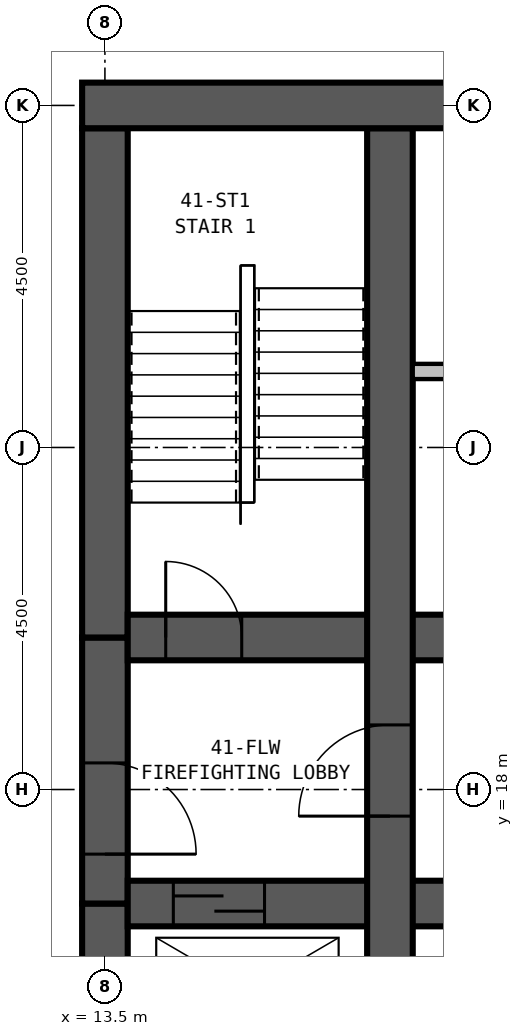
"""IFC4 building model, lengths in metres.
Left out: names, types, materials, properties, quantities, classifications, styles, units other than length and angle.
Written with IfcOpenShell. Run it as: python <this file> out.ifc"""

import sys

from ifc_helpers import new_model, si_unit, direction, frame, frame_2d, origin, place, context, subcontext, project, spatial, rectangle, extrude, element, fill, save


model = new_model("IFC4")
c1 = context("Model", 3, precision=1e-05, world=origin(), true_north=direction((0.0, 1.0)))
c2 = subcontext(c1, "Body", "Model", "MODEL_VIEW")
j1 = project(units=[si_unit("LENGTHUNIT", "METRE"), si_unit("PLANEANGLEUNIT", "RADIAN")], contexts=[c1])
p1 = place(None, origin())
s1 = spatial("IfcSite", under=j1, at=p1, CompositionType="ELEMENT")
p2 = place(p1, origin())
s2 = spatial("IfcBuilding", under=s1, at=p2, CompositionType="ELEMENT")
p3 = place(p2, frame((0.0, 0.0, 162.4)))
s3 = spatial("IfcBuildingStorey", under=s2, at=p3, CompositionType="ELEMENT", Elevation=162.4)
p4 = place(p3, frame((36.3, 27.0, 0.0), z_axis=(0.0, 0.0, 1.0), x_axis=(-1.0, 0.0, 0.0)))
e1 = element("IfcWall", 1, at=p4, inside=s3, PredefinedType="SHEAR", context=c2, shape_type="SweptSolid", body=[
    extrude(rectangle(XDim=23.1, YDim=0.6, at=frame_2d((11.55, 0.0))), origin(), (0.0, 0.0, 1.0), 3.5),
])
p5 = place(p4, frame((17.05, 0.0, 0.0)))
e2 = element("IfcOpeningElement", 2, at=p5, cuts=e1, PredefinedType="OPENING", context=c2, shape_type="SweptSolid", body=[
    extrude(rectangle(XDim=1.0, YDim=2.1, at=frame_2d((0.5, 1.05))), frame((0.0, 0.31, 0.0), z_axis=(0.0, -1.0, 0.0), x_axis=(1.0, 0.0, 0.0)), (0.0, 0.0, 1.0), 0.62),
])
p6 = place(p4, frame((12.05, 0.0, 0.0)))
e3 = element("IfcOpeningElement", 3, at=p6, cuts=e1, PredefinedType="OPENING", context=c2, shape_type="SweptSolid", body=[
    extrude(rectangle(XDim=1.0, YDim=2.1, at=frame_2d((0.5, 1.05))), frame((0.0, 0.31, 0.0), z_axis=(0.0, -1.0, 0.0), x_axis=(1.0, 0.0, 0.0)), (0.0, 0.0, 1.0), 0.62),
])
p7 = place(p4, frame((7.05, 0.0, 0.0)))
e4 = element("IfcOpeningElement", 4, at=p7, cuts=e1, PredefinedType="OPENING", context=c2, shape_type="SweptSolid", body=[
    extrude(rectangle(XDim=1.0, YDim=2.1, at=frame_2d((0.5, 1.05))), frame((0.0, 0.31, 0.0), z_axis=(0.0, -1.0, 0.0), x_axis=(1.0, 0.0, 0.0)), (0.0, 0.0, 1.0), 0.62),
])
p8 = place(p3, frame((17.25, 13.8, 0.0), z_axis=(0.0, 0.0, 1.0), x_axis=(0.0, 1.0, 0.0)))
e5 = element("IfcWall", 5, at=p8, inside=s3, PredefinedType="SHEAR", context=c2, shape_type="SweptSolid", body=[
    extrude(rectangle(XDim=12.9, YDim=0.6, at=frame_2d((6.45, 0.0))), origin(), (0.0, 0.0, 1.0), 3.5),
])
p9 = place(p8, frame((3.85, 0.0, 0.0)))
e6 = element("IfcOpeningElement", 6, at=p9, cuts=e5, PredefinedType="OPENING", context=c2, shape_type="SweptSolid", body=[
    extrude(rectangle(XDim=1.2, YDim=2.1, at=frame_2d((0.6, 1.05))), frame((0.0, 0.31, 0.0), z_axis=(0.0, -1.0, 0.0), x_axis=(1.0, 0.0, 0.0)), (0.0, 0.0, 1.0), 0.62),
])
p10 = place(p3, frame((13.8, 16.5, 0.0), z_axis=(0.0, 0.0, 1.0), x_axis=(1.0, 0.0, 0.0)))
e7 = element("IfcWall", 7, at=p10, inside=s3, PredefinedType="SHEAR", context=c2, shape_type="SweptSolid", body=[
    extrude(rectangle(XDim=21.9, YDim=0.6, at=frame_2d((10.95, 0.0))), origin(), (0.0, 0.0, 1.0), 3.5),
])
p11 = place(p10, frame((5.75, 0.0, 0.0), z_axis=(0.0, 0.0, 1.0), x_axis=(-1.0, 0.0, 0.0)))
e8 = element("IfcOpeningElement", 8, at=p11, cuts=e7, PredefinedType="OPENING", context=c2, shape_type="SweptSolid", body=[
    extrude(rectangle(XDim=1.0, YDim=2.1, at=frame_2d((0.5, 1.05))), frame((0.0, 0.31, 0.0), z_axis=(0.0, -1.0, 0.0), x_axis=(1.0, 0.0, 0.0)), (0.0, 0.0, 1.0), 0.62),
])
p12 = place(p10, frame((10.2, 0.0, 0.0), z_axis=(0.0, 0.0, 1.0), x_axis=(-1.0, 0.0, 0.0)))
e9 = element("IfcOpeningElement", 9, at=p12, cuts=e7, PredefinedType="OPENING", context=c2, shape_type="SweptSolid", body=[
    extrude(rectangle(XDim=1.0, YDim=2.1, at=frame_2d((0.5, 1.05))), frame((0.0, 0.31, 0.0), z_axis=(0.0, -1.0, 0.0), x_axis=(1.0, 0.0, 0.0)), (0.0, 0.0, 1.0), 0.62),
])
p13 = place(p10, frame((12.7, 0.0, 0.0), z_axis=(0.0, 0.0, 1.0), x_axis=(-1.0, 0.0, 0.0)))
e10 = element("IfcOpeningElement", 10, at=p13, cuts=e7, PredefinedType="OPENING", context=c2, shape_type="SweptSolid", body=[
    extrude(rectangle(XDim=1.0, YDim=2.1, at=frame_2d((0.5, 1.05))), frame((0.0, 0.31, 0.0), z_axis=(0.0, -1.0, 0.0), x_axis=(1.0, 0.0, 0.0)), (0.0, 0.0, 1.0), 0.62),
])
p14 = place(p10, frame((17.15, 0.0, 0.0), z_axis=(0.0, 0.0, 1.0), x_axis=(-1.0, 0.0, 0.0)))
e11 = element("IfcOpeningElement", 11, at=p14, cuts=e7, PredefinedType="OPENING", context=c2, shape_type="SweptSolid", body=[
    extrude(rectangle(XDim=1.0, YDim=2.1, at=frame_2d((0.5, 1.05))), frame((0.0, 0.31, 0.0), z_axis=(0.0, -1.0, 0.0), x_axis=(1.0, 0.0, 0.0)), (0.0, 0.0, 1.0), 0.62),
])
p15 = place(p10, frame((0.6, 0.0, 0.0)))
e12 = element("IfcOpeningElement", 12, at=p15, cuts=e7, PredefinedType="OPENING", context=c2, shape_type="SweptSolid", body=[
    extrude(rectangle(XDim=1.2, YDim=2.1, at=frame_2d((0.6, 1.05))), frame((0.0, 0.31, 0.0), z_axis=(0.0, -1.0, 0.0), x_axis=(1.0, 0.0, 0.0)), (0.0, 0.0, 1.0), 0.62),
])
p16 = place(p10, frame((19.6, 0.0, 0.0)))
e13 = element("IfcOpeningElement", 13, at=p16, cuts=e7, PredefinedType="OPENING", context=c2, shape_type="SweptSolid", body=[
    extrude(rectangle(XDim=1.2, YDim=2.1, at=frame_2d((0.6, 1.05))), frame((0.0, 0.31, 0.0), z_axis=(0.0, -1.0, 0.0), x_axis=(1.0, 0.0, 0.0)), (0.0, 0.0, 1.0), 0.62),
])
p17 = place(p3, frame((13.8, 20.0, 0.0), z_axis=(0.0, 0.0, 1.0), x_axis=(1.0, 0.0, 0.0)))
e14 = element("IfcWall", 14, at=p17, inside=s3, PredefinedType="SHEAR", context=c2, shape_type="SweptSolid", body=[
    extrude(rectangle(XDim=21.9, YDim=0.6, at=frame_2d((10.95, 0.0))), origin(), (0.0, 0.0, 1.0), 3.5),
])
p18 = place(p17, frame((0.5, 0.0, 0.0)))
e15 = element("IfcOpeningElement", 15, at=p18, cuts=e14, PredefinedType="OPENING", context=c2, shape_type="SweptSolid", body=[
    extrude(rectangle(XDim=1.0, YDim=2.1, at=frame_2d((0.5, 1.05))), frame((0.0, 0.31, 0.0), z_axis=(0.0, -1.0, 0.0), x_axis=(1.0, 0.0, 0.0)), (0.0, 0.0, 1.0), 0.62),
])
p19 = place(p17, frame((20.5, 0.0, 0.0)))
e16 = element("IfcOpeningElement", 16, at=p19, cuts=e14, PredefinedType="OPENING", context=c2, shape_type="SweptSolid", body=[
    extrude(rectangle(XDim=1.0, YDim=2.1, at=frame_2d((0.5, 1.05))), frame((0.0, 0.31, 0.0), z_axis=(0.0, -1.0, 0.0), x_axis=(1.0, 0.0, 0.0)), (0.0, 0.0, 1.0), 0.62),
])
p20 = place(p17, frame((9.15, 0.0, 0.0)))
e17 = element("IfcOpeningElement", 17, at=p20, cuts=e14, PredefinedType="OPENING", context=c2, shape_type="SweptSolid", body=[
    extrude(rectangle(XDim=1.1, YDim=2.1, at=frame_2d((0.55, 1.05))), frame((0.0, 0.31, 0.0), z_axis=(0.0, -1.0, 0.0), x_axis=(1.0, 0.0, 0.0)), (0.0, 0.0, 1.0), 0.62),
])
p21 = place(p17, frame((11.65, 0.0, 0.0)))
e18 = element("IfcOpeningElement", 18, at=p21, cuts=e14, PredefinedType="OPENING", context=c2, shape_type="SweptSolid", body=[
    extrude(rectangle(XDim=1.1, YDim=2.1, at=frame_2d((0.55, 1.05))), frame((0.0, 0.31, 0.0), z_axis=(0.0, -1.0, 0.0), x_axis=(1.0, 0.0, 0.0)), (0.0, 0.0, 1.0), 0.62),
])
p22 = place(p17, frame((14.15, 0.0, 0.0)))
e19 = element("IfcOpeningElement", 19, at=p22, cuts=e14, PredefinedType="OPENING", context=c2, shape_type="SweptSolid", body=[
    extrude(rectangle(XDim=1.1, YDim=2.1, at=frame_2d((0.55, 1.05))), frame((0.0, 0.31, 0.0), z_axis=(0.0, -1.0, 0.0), x_axis=(1.0, 0.0, 0.0)), (0.0, 0.0, 1.0), 0.62),
])
p23 = place(p17, frame((16.65, 0.0, 0.0)))
e20 = element("IfcOpeningElement", 20, at=p23, cuts=e14, PredefinedType="OPENING", context=c2, shape_type="SweptSolid", body=[
    extrude(rectangle(XDim=1.1, YDim=2.1, at=frame_2d((0.55, 1.05))), frame((0.0, 0.31, 0.0), z_axis=(0.0, -1.0, 0.0), x_axis=(1.0, 0.0, 0.0)), (0.0, 0.0, 1.0), 0.62),
])
p24 = place(p17, frame((4.75, 0.0, 0.0)))
e21 = element("IfcOpeningElement", 21, at=p24, cuts=e14, PredefinedType="OPENING", context=c2, shape_type="SweptSolid", body=[
    extrude(rectangle(XDim=1.0, YDim=2.1, at=frame_2d((0.5, 1.05))), frame((0.0, 0.31, 0.0), z_axis=(0.0, -1.0, 0.0), x_axis=(1.0, 0.0, 0.0)), (0.0, 0.0, 1.0), 0.62),
])
p25 = place(p17, frame((6.7, 0.0, 0.0)))
e22 = element("IfcOpeningElement", 22, at=p25, cuts=e14, PredefinedType="OPENING", context=c2, shape_type="SweptSolid", body=[
    extrude(rectangle(XDim=1.0, YDim=2.1, at=frame_2d((0.5, 1.05))), frame((0.0, 0.31, 0.0), z_axis=(0.0, -1.0, 0.0), x_axis=(1.0, 0.0, 0.0)), (0.0, 0.0, 1.0), 0.62),
])
p26 = place(p3, frame((13.5, 26.7, 0.0), z_axis=(0.0, 0.0, 1.0), x_axis=(0.0, -1.0, 0.0)))
e23 = element("IfcWall", 23, at=p26, inside=s3, PredefinedType="SHEAR", context=c2, shape_type="SweptSolid", body=[
    extrude(rectangle(XDim=6.7, YDim=0.6, at=frame_2d((3.35, 0.0))), origin(), (0.0, 0.0, 1.0), 3.5),
])
p27 = place(p3, frame((13.5, 20.0, 0.0), z_axis=(0.0, 0.0, 1.0), x_axis=(0.0, -1.0, 0.0)))
e24 = element("IfcWall", 24, at=p27, inside=s3, PredefinedType="SHEAR", context=c2, shape_type="SweptSolid", body=[
    extrude(rectangle(XDim=3.5, YDim=0.6, at=frame_2d((1.75, 0.0))), origin(), (0.0, 0.0, 1.0), 3.5),
])
p28 = place(p27, frame((1.65, 0.0, 0.0)))
e25 = element("IfcOpeningElement", 25, at=p28, cuts=e24, PredefinedType="OPENING", context=c2, shape_type="SweptSolid", body=[
    extrude(rectangle(XDim=1.2, YDim=2.1, at=frame_2d((0.6, 1.05))), frame((0.0, 0.31, 0.0), z_axis=(0.0, -1.0, 0.0), x_axis=(1.0, 0.0, 0.0)), (0.0, 0.0, 1.0), 0.62),
])
p29 = place(p3, frame((13.5, 16.5, 0.0), z_axis=(0.0, 0.0, 1.0), x_axis=(0.0, -1.0, 0.0)))
e26 = element("IfcWall", 26, at=p29, inside=s3, PredefinedType="SHEAR", context=c2, shape_type="SweptSolid", body=[
    extrude(rectangle(XDim=2.7, YDim=0.6, at=frame_2d((1.35, 0.0))), origin(), (0.0, 0.0, 1.0), 3.5),
])
p30 = place(p3, frame((17.55, 23.5, 0.0), z_axis=(0.0, 0.0, 1.0), x_axis=(1.0, 0.0, 0.0)))
e27 = element("IfcWall", 27, at=p30, inside=s3, PredefinedType="PARTITIONING", context=c2, shape_type="SweptSolid", body=[
    extrude(rectangle(XDim=14.4, YDim=0.2, at=frame_2d((7.2, 0.0))), origin(), (0.0, 0.0, 1.0), 3.25),
])
p31 = place(p28, origin())
e28 = element("IfcDoor", 28, at=p31, inside=s3, OperationType="SINGLE_SWING_RIGHT", PredefinedType="DOOR", context=c2, shape_type="SweptSolid", body=[
    extrude(rectangle(XDim=1.2, YDim=2.1, at=frame_2d((0.6, 1.05))), frame((0.0, 0.3, 0.0), z_axis=(0.0, -1.0, 0.0), x_axis=(1.0, 0.0, 0.0)), (0.0, 0.0, 1.0), 0.6),
])
fill(e25, e28)
p32 = place(p9, origin())
e29 = element("IfcDoor", 29, at=p32, inside=s3, OperationType="SINGLE_SWING_LEFT", PredefinedType="DOOR", context=c2, shape_type="SweptSolid", body=[
    extrude(rectangle(XDim=1.2, YDim=2.1, at=frame_2d((0.6, 1.05))), frame((0.0, 0.3, 0.0), z_axis=(0.0, -1.0, 0.0), x_axis=(1.0, 0.0, 0.0)), (0.0, 0.0, 1.0), 0.6),
])
fill(e6, e29)
p33 = place(p18, origin())
e30 = element("IfcDoor", 30, at=p33, inside=s3, OperationType="SINGLE_SWING_LEFT", PredefinedType="DOOR", context=c2, shape_type="SweptSolid", body=[
    extrude(rectangle(XDim=1.0, YDim=2.1, at=frame_2d((0.5, 1.05))), frame((0.0, 0.3, 0.0), z_axis=(0.0, -1.0, 0.0), x_axis=(1.0, 0.0, 0.0)), (0.0, 0.0, 1.0), 0.6),
])
fill(e15, e30)
p34 = place(p15, origin())
e31 = element("IfcDoor", 31, at=p34, inside=s3, OperationType="SLIDING_TO_LEFT", PredefinedType="DOOR", context=c2, shape_type="SweptSolid", body=[
    extrude(rectangle(XDim=1.2, YDim=2.1, at=frame_2d((0.6, 1.05))), frame((0.0, 0.3, 0.0), z_axis=(0.0, -1.0, 0.0), x_axis=(1.0, 0.0, 0.0)), (0.0, 0.0, 1.0), 0.6),
])
fill(e12, e31)
save(model, sys.argv[1])
